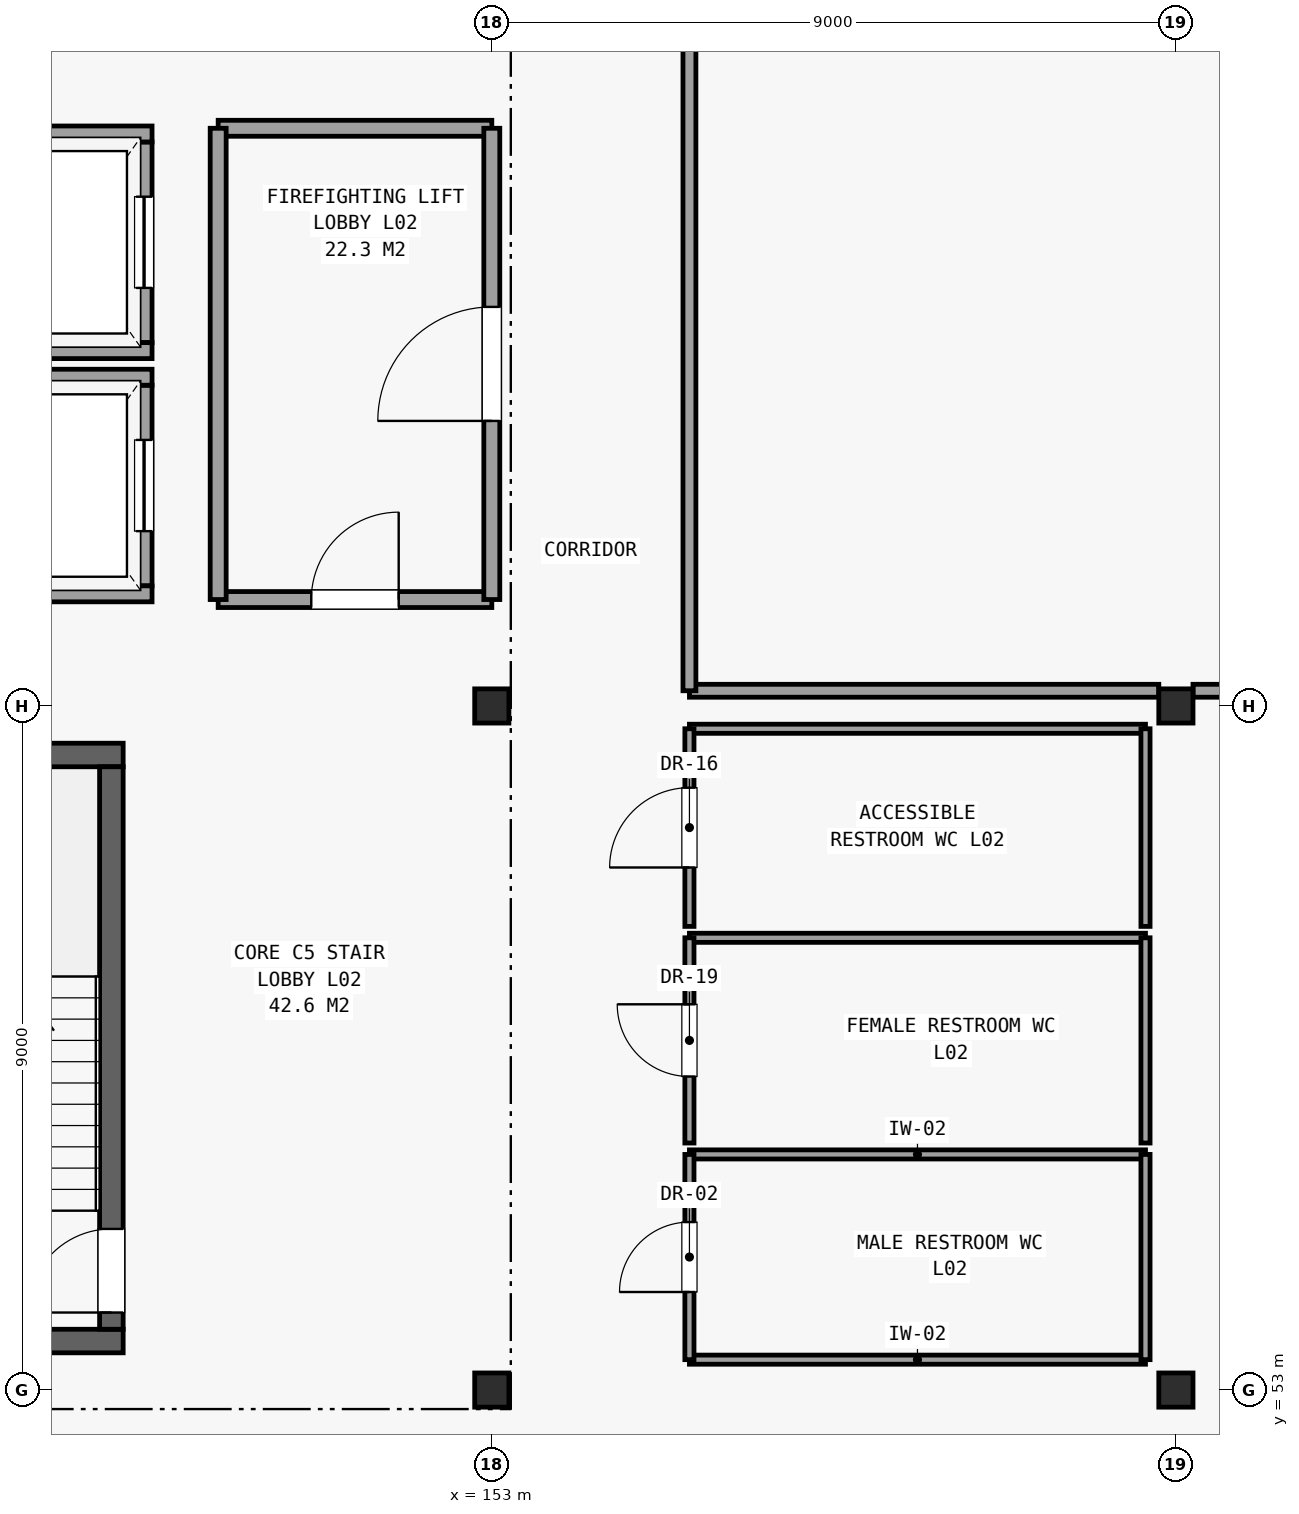
"""IFC4 building model, lengths in metres.
Left out: names, types, materials, properties, quantities, classifications, styles, units other than length and angle.
Written with IfcOpenShell. Run it as: python <this file> out.ifc"""

import sys

from ifc_helpers import new_model, si_unit, direction, frame, frame_2d, origin, origin_2d, place, context, subcontext, project, spatial, rectangle, hollow_rectangle, extrude, element, fill, save


model = new_model("IFC4")
c1 = context("Model", 3, precision=1e-05, world=origin(), true_north=direction((0.0, 1.0)))
c2 = subcontext(c1, "Body", "Model", "MODEL_VIEW")
j1 = project(units=[si_unit("LENGTHUNIT", "METRE"), si_unit("PLANEANGLEUNIT", "RADIAN")], contexts=[c1])
p1 = place(None, origin())
s1 = spatial("IfcSite", under=j1, at=p1, CompositionType="ELEMENT")
p2 = place(p1, origin())
s2 = spatial("IfcBuilding", under=s1, at=p2, CompositionType="ELEMENT")
p3 = place(p2, frame((0.0, 0.0, 9.3)))
s3 = spatial("IfcBuildingStorey", under=s2, at=p3, CompositionType="ELEMENT", Elevation=9.3)
for number, where, z_axis, x_axis in (
    (1, (153.0, 53.0, 0.0), (0.0, 0.0, 1.0), (1.0, 0.0, 0.0)),
    (2, (153.0, 62.0, 0.0), (0.0, 0.0, 1.0), (1.0, 0.0, 0.0)),
    (3, (162.0, 53.0, 0.0), (0.0, 0.0, 1.0), (1.0, 0.0, 0.0)),
    (4, (162.0, 62.0, 0.0), (0.0, 0.0, 1.0), (1.0, 0.0, 0.0)),
):
    element("IfcColumn", number, at=place(p3, frame(where, z_axis=z_axis, x_axis=x_axis)), inside=s3, PredefinedType="COLUMN", context=c2, shape_type="SweptSolid", body=[
        extrude(hollow_rectangle(XDim=0.45, YDim=0.45, WallThickness=0.022, at=origin_2d()), origin(), (0.0, 0.0, 1.0), 4.2),
    ])
for number, where, z_axis, x_axis in (
    (5, (144.25, 53.645, 0.0), (0.0, 0.0, 1.0), (1.0, 0.0, 0.0)),
    (6, (144.25, 61.355, 0.0), (0.0, 0.0, 1.0), (1.0, 0.0, 0.0)),
):
    element("IfcWall", number, at=place(p3, frame(where, z_axis=z_axis, x_axis=x_axis)), inside=s3, PredefinedType="SHEAR", context=c2, shape_type="SweptSolid", body=[
        extrude(rectangle(XDim=3.9, YDim=0.31, at=frame_2d((1.95, 0.0))), origin(), (0.0, 0.0, 1.0), 3.95),
    ])
p4 = place(p3, frame((147.995, 53.8, 0.0), z_axis=(0.0, 0.0, 1.0), x_axis=(0.0, 1.0, 0.0)))
e7 = element("IfcWall", 7, at=p4, inside=s3, PredefinedType="SHEAR", context=c2, shape_type="SweptSolid", body=[
    extrude(rectangle(XDim=7.4, YDim=0.31, at=frame_2d((3.7, 0.0))), origin(), (0.0, 0.0, 1.0), 3.95),
])
p5 = place(p4, frame((0.22, 0.0, 0.0)))
e8 = element("IfcOpeningElement", 8, at=p5, cuts=e7, PredefinedType="OPENING", context=c2, shape_type="SweptSolid", body=[
    extrude(rectangle(XDim=1.1, YDim=2.15, at=frame_2d((0.55, 1.075))), frame((0.0, 0.166, 0.0), z_axis=(0.0, -1.0, 0.0), x_axis=(1.0, 0.0, 0.0)), (0.0, 0.0, 1.0), 0.332),
])
p6 = place(p3, frame((148.425, 63.58, 0.0), z_axis=(0.0, 0.0, 1.0), x_axis=(0.0, 1.0, 0.0)))
e9 = element("IfcWall", 9, at=p6, inside=s3, PredefinedType="PARTITIONING", context=c2, shape_type="SweptSolid", body=[
    extrude(rectangle(XDim=2.64, YDim=0.21, at=frame_2d((1.32, 0.0))), origin(), (0.0, 0.0, 1.0), 3.95),
])
p7 = place(p6, frame((0.72, 0.0, 0.0)))
e10 = element("IfcOpeningElement", 10, at=p7, cuts=e9, PredefinedType="OPENING", context=c2, shape_type="SweptSolid", body=[
    extrude(rectangle(XDim=1.2, YDim=2.2, at=frame_2d((0.6, 1.1))), frame((0.0, 0.116, 0.0), z_axis=(0.0, -1.0, 0.0), x_axis=(1.0, 0.0, 0.0)), (0.0, 0.0, 1.0), 0.232),
])
for number, where, z_axis, x_axis in (
    (11, (146.27, 63.475, 0.0), (0.0, 0.0, 1.0), (1.0, 0.0, 0.0)),
    (12, (146.27, 66.325, 0.0), (0.0, 0.0, 1.0), (1.0, 0.0, 0.0)),
):
    element("IfcWall", number, at=place(p3, frame(where, z_axis=z_axis, x_axis=x_axis)), inside=s3, PredefinedType="PARTITIONING", context=c2, shape_type="SweptSolid", body=[
        extrude(rectangle(XDim=2.26, YDim=0.21, at=frame_2d((1.13, 0.0))), origin(), (0.0, 0.0, 1.0), 3.95),
    ])
p8 = place(p3, frame((148.425, 66.78, 0.0), z_axis=(0.0, 0.0, 1.0), x_axis=(0.0, 1.0, 0.0)))
e13 = element("IfcWall", 13, at=p8, inside=s3, PredefinedType="PARTITIONING", context=c2, shape_type="SweptSolid", body=[
    extrude(rectangle(XDim=2.64, YDim=0.21, at=frame_2d((1.32, 0.0))), origin(), (0.0, 0.0, 1.0), 3.95),
])
p9 = place(p8, frame((0.72, 0.0, 0.0)))
e14 = element("IfcOpeningElement", 14, at=p9, cuts=e13, PredefinedType="OPENING", context=c2, shape_type="SweptSolid", body=[
    extrude(rectangle(XDim=1.2, YDim=2.2, at=frame_2d((0.6, 1.1))), frame((0.0, 0.116, 0.0), z_axis=(0.0, -1.0, 0.0), x_axis=(1.0, 0.0, 0.0)), (0.0, 0.0, 1.0), 0.232),
])
for number, where, z_axis, x_axis in (
    (15, (146.27, 66.675, 0.0), (0.0, 0.0, 1.0), (1.0, 0.0, 0.0)),
    (16, (146.27, 69.525, 0.0), (0.0, 0.0, 1.0), (1.0, 0.0, 0.0)),
):
    element("IfcWall", number, at=place(p3, frame(where, z_axis=z_axis, x_axis=x_axis)), inside=s3, PredefinedType="PARTITIONING", context=c2, shape_type="SweptSolid", body=[
        extrude(rectangle(XDim=2.26, YDim=0.21, at=frame_2d((1.13, 0.0))), origin(), (0.0, 0.0, 1.0), 3.95),
    ])
p10 = place(p3, frame((149.4, 63.4, 0.0), z_axis=(0.0, 0.0, 1.0), x_axis=(1.0, 0.0, 0.0)))
e17 = element("IfcWall", 17, at=p10, inside=s3, PredefinedType="PARTITIONING", context=c2, shape_type="SweptSolid", body=[
    extrude(rectangle(XDim=3.6, YDim=0.21, at=frame_2d((1.8, 0.0))), origin(), (0.0, 0.0, 1.0), 3.3),
])
p11 = place(p10, frame((1.225, 0.0, 0.0)))
e18 = element("IfcOpeningElement", 18, at=p11, cuts=e17, PredefinedType="OPENING", context=c2, shape_type="SweptSolid", body=[
    extrude(rectangle(XDim=1.15, YDim=2.2, at=frame_2d((0.575, 1.1))), frame((0.0, 0.116, 0.0), z_axis=(0.0, -1.0, 0.0), x_axis=(1.0, 0.0, 0.0)), (0.0, 0.0, 1.0), 0.232),
])
p12 = place(p3, frame((149.4, 69.6, 0.0), z_axis=(0.0, 0.0, 1.0), x_axis=(1.0, 0.0, 0.0)))
e19 = element("IfcWall", 19, at=p12, inside=s3, PredefinedType="PARTITIONING", context=c2, shape_type="SweptSolid", body=[
    extrude(rectangle(XDim=3.6, YDim=0.21, at=frame_2d((1.8, 0.0))), origin(), (0.0, 0.0, 1.0), 3.3),
])
p13 = place(p3, frame((149.4, 63.4, 0.0), z_axis=(0.0, 0.0, 1.0), x_axis=(0.0, 1.0, 0.0)))
e20 = element("IfcWall", 20, at=p13, inside=s3, PredefinedType="PARTITIONING", context=c2, shape_type="SweptSolid", body=[
    extrude(rectangle(XDim=6.2, YDim=0.21, at=frame_2d((3.1, 0.0))), origin(), (0.0, 0.0, 1.0), 3.95),
])
p14 = place(p3, frame((153.0, 63.4, 0.0), z_axis=(0.0, 0.0, 1.0), x_axis=(0.0, 1.0, 0.0)))
e21 = element("IfcWall", 21, at=p14, inside=s3, PredefinedType="PARTITIONING", context=c2, shape_type="SweptSolid", body=[
    extrude(rectangle(XDim=6.2, YDim=0.21, at=frame_2d((3.1, 0.0))), origin(), (0.0, 0.0, 1.0), 3.3),
])
p15 = place(p14, frame((2.35, 0.0, 0.0)))
e22 = element("IfcOpeningElement", 22, at=p15, cuts=e21, PredefinedType="OPENING", context=c2, shape_type="SweptSolid", body=[
    extrude(rectangle(XDim=1.5, YDim=2.25, at=frame_2d((0.75, 1.125))), frame((0.0, 0.116, 0.0), z_axis=(0.0, -1.0, 0.0), x_axis=(1.0, 0.0, 0.0)), (0.0, 0.0, 1.0), 0.232),
])
for number, where, z_axis, x_axis in (
    (23, (155.6, 53.4, 0.0), (0.0, 0.0, 1.0), (1.0, 0.0, 0.0)),
    (24, (155.6, 56.1, 0.0), (0.0, 0.0, 1.0), (1.0, 0.0, 0.0)),
):
    element("IfcWall", number, at=place(p3, frame(where, z_axis=z_axis, x_axis=x_axis)), inside=s3, PredefinedType="PARTITIONING", context=c2, shape_type="SweptSolid", body=[
        extrude(rectangle(XDim=6.0, YDim=0.12, at=frame_2d((3.0, 0.0))), origin(), (0.0, 0.0, 1.0), 3.95),
    ])
p16 = place(p3, frame((155.6, 53.4, 0.0), z_axis=(0.0, 0.0, 1.0), x_axis=(0.0, 1.0, 0.0)))
e25 = element("IfcWall", 25, at=p16, inside=s3, PredefinedType="PARTITIONING", context=c2, shape_type="SweptSolid", body=[
    extrude(rectangle(XDim=2.7, YDim=0.12, at=frame_2d((1.35, 0.0))), origin(), (0.0, 0.0, 1.0), 3.95),
])
p17 = place(p16, frame((0.89, 0.0, 0.0)))
e26 = element("IfcOpeningElement", 26, at=p17, cuts=e25, PredefinedType="OPENING", context=c2, shape_type="SweptSolid", body=[
    extrude(rectangle(XDim=0.92, YDim=2.1, at=frame_2d((0.46, 1.05))), frame((0.0, 0.071, 0.0), z_axis=(0.0, -1.0, 0.0), x_axis=(1.0, 0.0, 0.0)), (0.0, 0.0, 1.0), 0.142),
])
p18 = place(p3, frame((161.6, 53.4, 0.0), z_axis=(0.0, 0.0, 1.0), x_axis=(0.0, 1.0, 0.0)))
e27 = element("IfcWall", 27, at=p18, inside=s3, PredefinedType="PARTITIONING", context=c2, shape_type="SweptSolid", body=[
    extrude(rectangle(XDim=2.7, YDim=0.12, at=frame_2d((1.35, 0.0))), origin(), (0.0, 0.0, 1.0), 3.95),
])
p19 = place(p3, frame((155.6, 58.95, 0.0), z_axis=(0.0, 0.0, 1.0), x_axis=(1.0, 0.0, 0.0)))
e28 = element("IfcWall", 28, at=p19, inside=s3, PredefinedType="PARTITIONING", context=c2, shape_type="SweptSolid", body=[
    extrude(rectangle(XDim=6.0, YDim=0.12, at=frame_2d((3.0, 0.0))), origin(), (0.0, 0.0, 1.0), 3.95),
])
p20 = place(p3, frame((155.6, 56.25, 0.0), z_axis=(0.0, 0.0, 1.0), x_axis=(0.0, 1.0, 0.0)))
e29 = element("IfcWall", 29, at=p20, inside=s3, PredefinedType="PARTITIONING", context=c2, shape_type="SweptSolid", body=[
    extrude(rectangle(XDim=2.7, YDim=0.12, at=frame_2d((1.35, 0.0))), origin(), (0.0, 0.0, 1.0), 3.55),
])
p21 = place(p20, frame((0.875, 0.0, 0.0)))
e30 = element("IfcOpeningElement", 30, at=p21, cuts=e29, PredefinedType="OPENING", context=c2, shape_type="SweptSolid", body=[
    extrude(rectangle(XDim=0.95, YDim=2.15, at=frame_2d((0.475, 1.075))), frame((0.0, 0.071, 0.0), z_axis=(0.0, -1.0, 0.0), x_axis=(1.0, 0.0, 0.0)), (0.0, 0.0, 1.0), 0.142),
])
p22 = place(p3, frame((161.6, 56.25, 0.0), z_axis=(0.0, 0.0, 1.0), x_axis=(0.0, 1.0, 0.0)))
e31 = element("IfcWall", 31, at=p22, inside=s3, PredefinedType="PARTITIONING", context=c2, shape_type="SweptSolid", body=[
    extrude(rectangle(XDim=2.7, YDim=0.12, at=frame_2d((1.35, 0.0))), origin(), (0.0, 0.0, 1.0), 3.55),
])
p23 = place(p3, frame((155.6, 61.7, 0.0), z_axis=(0.0, 0.0, 1.0), x_axis=(1.0, 0.0, 0.0)))
e32 = element("IfcWall", 32, at=p23, inside=s3, PredefinedType="PARTITIONING", context=c2, shape_type="SweptSolid", body=[
    extrude(rectangle(XDim=6.0, YDim=0.12, at=frame_2d((3.0, 0.0))), origin(), (0.0, 0.0, 1.0), 3.362),
])
p24 = place(p3, frame((155.6, 59.1, 0.0), z_axis=(0.0, 0.0, 1.0), x_axis=(0.0, 1.0, 0.0)))
e33 = element("IfcWall", 33, at=p24, inside=s3, PredefinedType="PARTITIONING", context=c2, shape_type="SweptSolid", body=[
    extrude(rectangle(XDim=2.6, YDim=0.12, at=frame_2d((1.3, 0.0))), origin(), (0.0, 0.0, 1.0), 3.362),
])
p25 = place(p24, frame((0.775, 0.0, 0.0)))
e34 = element("IfcOpeningElement", 34, at=p25, cuts=e33, PredefinedType="OPENING", context=c2, shape_type="SweptSolid", body=[
    extrude(rectangle(XDim=1.05, YDim=2.2, at=frame_2d((0.525, 1.1))), frame((0.0, 0.071, 0.0), z_axis=(0.0, -1.0, 0.0), x_axis=(1.0, 0.0, 0.0)), (0.0, 0.0, 1.0), 0.142),
])
p26 = place(p3, frame((161.6, 59.1, 0.0), z_axis=(0.0, 0.0, 1.0), x_axis=(0.0, 1.0, 0.0)))
e35 = element("IfcWall", 35, at=p26, inside=s3, PredefinedType="PARTITIONING", context=c2, shape_type="SweptSolid", body=[
    extrude(rectangle(XDim=2.6, YDim=0.12, at=frame_2d((1.3, 0.0))), origin(), (0.0, 0.0, 1.0), 3.362),
])
p27 = place(p3, frame((155.6, 62.2, 0.0), z_axis=(0.0, 0.0, 1.0), x_axis=(1.0, 0.0, 0.0)))
e36 = element("IfcWall", 36, at=p27, inside=s3, PredefinedType="PARTITIONING", context=c2, shape_type="SweptSolid", body=[
    extrude(rectangle(XDim=6.175, YDim=0.17, at=frame_2d((3.087, 0.0))), origin(), (0.0, 0.0, 1.0), 3.3),
])
p28 = place(p3, frame((162.225, 62.2, 0.0), z_axis=(0.0, 0.0, 1.0), x_axis=(1.0, 0.0, 0.0)))
e37 = element("IfcWall", 37, at=p28, inside=s3, PredefinedType="PARTITIONING", context=c2, shape_type="SweptSolid", body=[
    extrude(rectangle(XDim=8.55, YDim=0.17, at=frame_2d((4.275, 0.0))), origin(), (0.0, 0.0, 1.0), 3.3),
])
p29 = place(p3, frame((155.6, 62.2, 0.0), z_axis=(0.0, 0.0, 1.0), x_axis=(0.0, 1.0, 0.0)))
e38 = element("IfcWall", 38, at=p29, inside=s3, PredefinedType="PARTITIONING", context=c2, shape_type="SweptSolid", body=[
    extrude(rectangle(XDim=26.6, YDim=0.17, at=frame_2d((13.3, 0.0))), origin(), (0.0, 0.0, 1.0), 3.362),
])
p30 = place(p29, frame((12.56, 0.0, 0.0)))
e39 = element("IfcOpeningElement", 39, at=p30, cuts=e38, PredefinedType="OPENING", context=c2, shape_type="SweptSolid", body=[
    extrude(rectangle(XDim=1.48, YDim=2.35, at=frame_2d((0.74, 1.175))), frame((0.0, 0.096, 0.0), z_axis=(0.0, -1.0, 0.0), x_axis=(1.0, 0.0, 0.0)), (0.0, 0.0, 1.0), 0.192),
])
p31 = place(p5, origin())
e40 = element("IfcDoor", 40, at=p31, inside=s3, OperationType="SINGLE_SWING_LEFT", PredefinedType="DOOR", context=c2, shape_type="SweptSolid", body=[
    extrude(rectangle(XDim=1.1, YDim=2.15, at=frame_2d((0.55, 1.075))), frame((0.0, 0.025, 0.0), z_axis=(0.0, -1.0, 0.0), x_axis=(1.0, 0.0, 0.0)), (0.0, 0.0, 1.0), 0.05),
])
fill(e8, e40)
p32 = place(p7, origin())
e41 = element("IfcDoor", 41, at=p32, inside=s3, OperationType="SLIDING_TO_LEFT", PredefinedType="DOOR", context=c2, shape_type="SweptSolid", body=[
    extrude(rectangle(XDim=1.2, YDim=2.2, at=frame_2d((0.6, 1.1))), frame((0.0, 0.025, 0.0), z_axis=(0.0, -1.0, 0.0), x_axis=(1.0, 0.0, 0.0)), (0.0, 0.0, 1.0), 0.05),
])
fill(e10, e41)
p33 = place(p9, origin())
e42 = element("IfcDoor", 42, at=p33, inside=s3, OperationType="SLIDING_TO_RIGHT", PredefinedType="DOOR", context=c2, shape_type="SweptSolid", body=[
    extrude(rectangle(XDim=1.2, YDim=2.2, at=frame_2d((0.6, 1.1))), frame((0.0, 0.025, 0.0), z_axis=(0.0, -1.0, 0.0), x_axis=(1.0, 0.0, 0.0)), (0.0, 0.0, 1.0), 0.05),
])
fill(e14, e42)
p34 = place(p11, origin())
e43 = element("IfcDoor", 43, at=p34, inside=s3, OperationType="SINGLE_SWING_RIGHT", PredefinedType="DOOR", context=c2, shape_type="SweptSolid", body=[
    extrude(rectangle(XDim=1.15, YDim=2.2, at=frame_2d((0.575, 1.1))), frame((0.0, 0.025, 0.0), z_axis=(0.0, -1.0, 0.0), x_axis=(1.0, 0.0, 0.0)), (0.0, 0.0, 1.0), 0.05),
])
fill(e18, e43)
p35 = place(p15, origin())
e44 = element("IfcDoor", 44, at=p35, inside=s3, OperationType="SINGLE_SWING_LEFT", PredefinedType="DOOR", context=c2, shape_type="SweptSolid", body=[
    extrude(rectangle(XDim=1.5, YDim=2.25, at=frame_2d((0.75, 1.125))), frame((0.0, 0.025, 0.0), z_axis=(0.0, -1.0, 0.0), x_axis=(1.0, 0.0, 0.0)), (0.0, 0.0, 1.0), 0.05),
])
fill(e22, e44)
p36 = place(p17, origin())
e45 = element("IfcDoor", 45, at=p36, inside=s3, OperationType="SINGLE_SWING_LEFT", PredefinedType="DOOR", context=c2, shape_type="SweptSolid", body=[
    extrude(rectangle(XDim=0.92, YDim=2.1, at=frame_2d((0.46, 1.05))), frame((0.0, 0.025, 0.0), z_axis=(0.0, -1.0, 0.0), x_axis=(1.0, 0.0, 0.0)), (0.0, 0.0, 1.0), 0.05),
])
fill(e26, e45)
p37 = place(p21, origin())
e46 = element("IfcDoor", 46, at=p37, inside=s3, OperationType="SINGLE_SWING_RIGHT", PredefinedType="DOOR", context=c2, shape_type="SweptSolid", body=[
    extrude(rectangle(XDim=0.95, YDim=2.15, at=frame_2d((0.475, 1.075))), frame((0.0, 0.025, 0.0), z_axis=(0.0, -1.0, 0.0), x_axis=(1.0, 0.0, 0.0)), (0.0, 0.0, 1.0), 0.05),
])
fill(e30, e46)
p38 = place(p25, origin())
e47 = element("IfcDoor", 47, at=p38, inside=s3, OperationType="SINGLE_SWING_LEFT", PredefinedType="DOOR", context=c2, shape_type="SweptSolid", body=[
    extrude(rectangle(XDim=1.05, YDim=2.2, at=frame_2d((0.525, 1.1))), frame((0.0, 0.025, 0.0), z_axis=(0.0, -1.0, 0.0), x_axis=(1.0, 0.0, 0.0)), (0.0, 0.0, 1.0), 0.05),
])
fill(e34, e47)
save(model, sys.argv[1])
